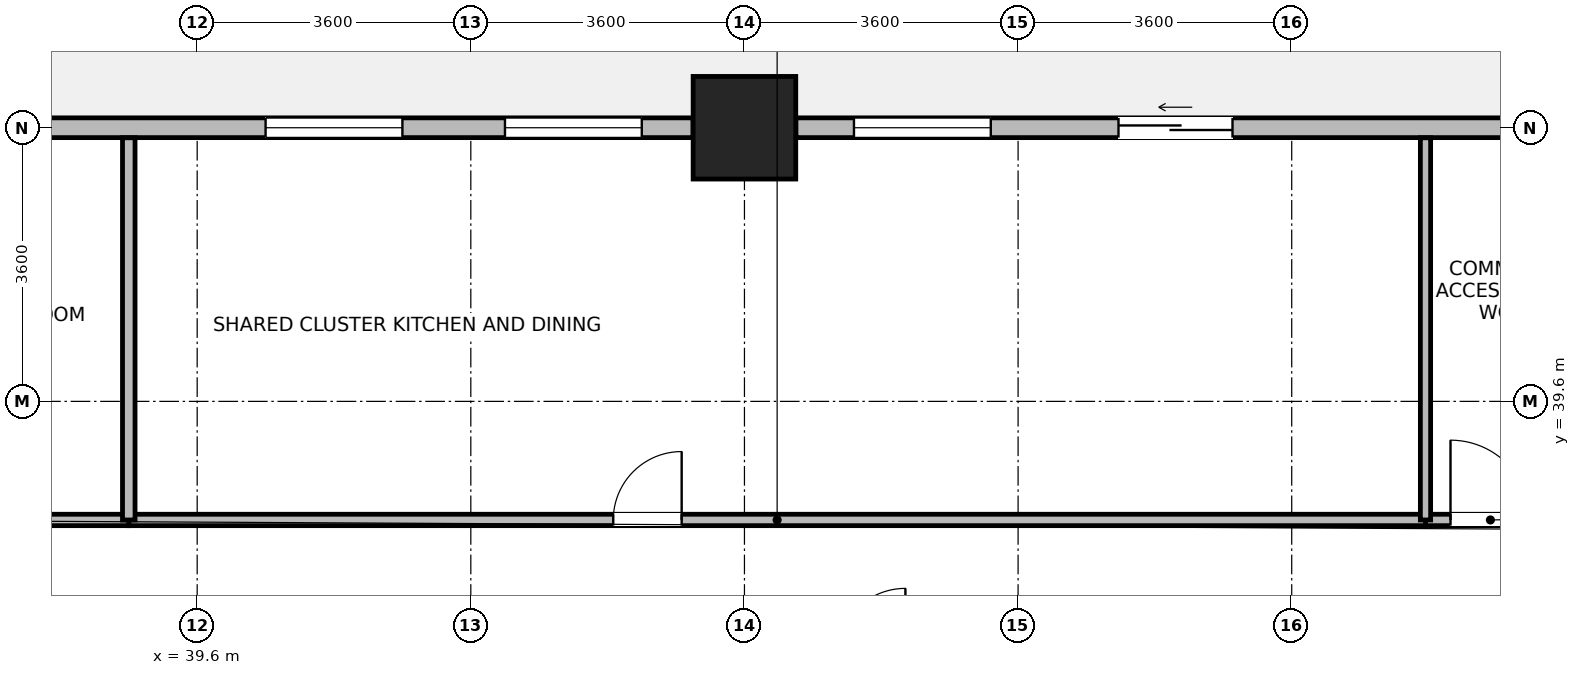
"""IFC4 building model, lengths in metres.
Left out: names, types, materials, properties, quantities, classifications, styles, units other than length and angle.
Written with IfcOpenShell. Run it as: python <this file> out.ifc"""

import sys

from ifc_helpers import new_model, si_unit, direction, frame, frame_2d, origin, origin_2d, place, context, subcontext, project, spatial, rectangle, extrude, source, transform, mapped, element, fill, save


model = new_model("IFC4")
c1 = context("Model", 3, precision=1e-05, world=origin(), true_north=direction((0.0, 1.0)))
c2 = subcontext(c1, "Body", "Model", "MODEL_VIEW")
j1 = project(units=[si_unit("LENGTHUNIT", "METRE"), si_unit("PLANEANGLEUNIT", "RADIAN")], contexts=[c1])
p1 = place(None, origin())
s1 = spatial("IfcSite", under=j1, at=p1, CompositionType="ELEMENT")
p2 = place(p1, origin())
s2 = spatial("IfcBuilding", under=s1, at=p2, CompositionType="ELEMENT")
p3 = place(p2, frame((0.0, 0.0, 36.4)))
s3 = spatial("IfcBuildingStorey", under=s2, at=p3, CompositionType="ELEMENT", Elevation=36.4)
m1 = source(origin(), c2, "Body", "SweptSolid", [
    extrude(rectangle(XDim=1.35, YDim=1.35, at=origin_2d()), origin(), (0.0, 0.0, 1.0), 3.7),
])
p4 = place(p3, frame((46.8, 43.2, 0.0), z_axis=(0.0, 0.0, 1.0), x_axis=(1.0, 0.0, 0.0)))
e1 = element("IfcColumn", 1, at=p4, inside=s3, PredefinedType="COLUMN", context=c2, shape_type="MappedRepresentation", body=[
    mapped(m1, transform((0.0, 0.0, 0.0), x_axis=(1.0, 0.0, 0.0), y_axis=(0.0, 1.0, 0.0), z_axis=(0.0, 0.0, 1.0), scale=1.0)),
])
p5 = place(p3, frame((47.476, 43.2, 0.0), z_axis=(0.0, 0.0, 1.0), x_axis=(1.0, 0.0, 0.0)))
e2 = element("IfcWall", 2, at=p5, inside=s3, PredefinedType="STANDARD", context=c2, shape_type="SweptSolid", body=[
    extrude(rectangle(XDim=9.989, YDim=0.26, at=frame_2d((4.995, 0.0))), origin(), (0.0, 0.0, 1.0), 3.43),
])
p6 = place(p5, frame((4.245, 0.0, 0.0)))
e3 = element("IfcOpeningElement", 3, at=p6, cuts=e2, PredefinedType="OPENING", context=c2, shape_type="SweptSolid", body=[
    extrude(rectangle(XDim=1.5, YDim=2.15, at=frame_2d((0.75, 1.075))), frame((0.0, 0.14, 0.0), z_axis=(0.0, -1.0, 0.0), x_axis=(1.0, 0.0, 0.0)), (0.0, 0.0, 1.0), 0.28),
])
p7 = place(p5, frame((0.765, 0.0, 0.85)))
e4 = element("IfcOpeningElement", 4, at=p7, cuts=e2, PredefinedType="OPENING", context=c2, shape_type="SweptSolid", body=[
    extrude(rectangle(XDim=1.8, YDim=1.85, at=frame_2d((0.9, 0.925))), frame((0.0, 0.14, 0.0), z_axis=(0.0, -1.0, 0.0), x_axis=(1.0, 0.0, 0.0)), (0.0, 0.0, 1.0), 0.28),
])
p8 = place(p3, frame((36.676, 43.2, 0.0), z_axis=(0.0, 0.0, 1.0), x_axis=(1.0, 0.0, 0.0)))
e5 = element("IfcWall", 5, at=p8, inside=s3, PredefinedType="STANDARD", context=c2, shape_type="SweptSolid", body=[
    extrude(rectangle(XDim=9.448, YDim=0.26, at=frame_2d((4.724, 0.0))), origin(), (0.0, 0.0, 1.0), 2.93),
])
p9 = place(p8, frame((3.824, 0.0, 0.85)))
e6 = element("IfcOpeningElement", 6, at=p9, cuts=e5, PredefinedType="OPENING", context=c2, shape_type="SweptSolid", body=[
    extrude(rectangle(XDim=1.8, YDim=1.85, at=frame_2d((0.9, 0.925))), frame((0.0, 0.14, 0.0), z_axis=(0.0, -1.0, 0.0), x_axis=(1.0, 0.0, 0.0)), (0.0, 0.0, 1.0), 0.28),
])
p10 = place(p8, frame((6.973, 0.0, 0.85)))
e7 = element("IfcOpeningElement", 7, at=p10, cuts=e5, PredefinedType="OPENING", context=c2, shape_type="SweptSolid", body=[
    extrude(rectangle(XDim=1.8, YDim=1.85, at=frame_2d((0.9, 0.925))), frame((0.0, 0.14, 0.0), z_axis=(0.0, -1.0, 0.0), x_axis=(1.0, 0.0, 0.0)), (0.0, 0.0, 1.0), 0.28),
])
p11 = place(p3, frame((38.7, 38.04, 0.0), z_axis=(0.0, 0.0, 1.0), x_axis=(1.0, 0.0, 0.0)))
e8 = element("IfcWall", 8, at=p11, inside=s3, PredefinedType="PARTITIONING", context=c2, shape_type="SweptSolid", body=[
    extrude(rectangle(XDim=17.06, YDim=0.15, at=frame_2d((8.53, 0.0))), origin(), (0.0, 0.0, 1.0), 3.43),
])
p12 = place(p11, frame((6.374, 0.0, 0.0)))
e9 = element("IfcOpeningElement", 9, at=p12, cuts=e8, PredefinedType="OPENING", context=c2, shape_type="SweptSolid", body=[
    extrude(rectangle(XDim=0.9, YDim=2.08, at=frame_2d((0.45, 1.04))), frame((0.0, 0.085, 0.0), z_axis=(0.0, -1.0, 0.0), x_axis=(1.0, 0.0, 0.0)), (0.0, 0.0, 1.0), 0.17),
])
p13 = place(p3, frame((29.72, 38.04, 0.0), z_axis=(0.0, 0.0, 1.0), x_axis=(1.0, 0.0, 0.0)))
e10 = element("IfcWall", 10, at=p13, inside=s3, PredefinedType="PARTITIONING", context=c2, shape_type="SweptSolid", body=[
    extrude(rectangle(XDim=8.98, YDim=0.15, at=frame_2d((4.49, 0.0))), origin(), (0.0, 0.0, 1.0), 3.43),
])
p14 = place(p13, frame((4.015, 0.0, 0.0)))
e11 = element("IfcOpeningElement", 11, at=p14, cuts=e10, PredefinedType="OPENING", context=c2, shape_type="SweptSolid", body=[
    extrude(rectangle(XDim=0.95, YDim=2.1, at=frame_2d((0.475, 1.05))), frame((0.0, 0.085, 0.0), z_axis=(0.0, -1.0, 0.0), x_axis=(1.0, 0.0, 0.0)), (0.0, 0.0, 1.0), 0.17),
])
p15 = place(p3, frame((55.76, 38.04, 0.0), z_axis=(0.0, 0.0, 1.0), x_axis=(1.0, 0.0, 0.0)))
e12 = element("IfcWall", 12, at=p15, inside=s3, PredefinedType="PARTITIONING", context=c2, shape_type="SweptSolid", body=[
    extrude(rectangle(XDim=1.708, YDim=0.15, at=frame_2d((0.854, 0.0))), origin(), (0.0, 0.0, 1.0), 3.43),
])
p16 = place(p15, frame((0.329, 0.0, 0.0)))
e13 = element("IfcOpeningElement", 13, at=p16, cuts=e12, PredefinedType="OPENING", context=c2, shape_type="SweptSolid", body=[
    extrude(rectangle(XDim=1.05, YDim=2.12, at=frame_2d((0.525, 1.06))), frame((0.0, 0.085, 0.0), z_axis=(0.0, -1.0, 0.0), x_axis=(1.0, 0.0, 0.0)), (0.0, 0.0, 1.0), 0.17),
])
p17 = place(p3, frame((38.7, 38.04, 0.0), z_axis=(0.0, 0.0, 1.0), x_axis=(0.0, 1.0, 0.0)))
e14 = element("IfcWall", 14, at=p17, inside=s3, PredefinedType="PARTITIONING", context=c2, shape_type="SweptSolid", body=[
    extrude(rectangle(XDim=5.028, YDim=0.165, at=frame_2d((2.514, 0.0))), origin(), (0.0, 0.0, 1.0), 3.43),
])
p18 = place(p3, frame((55.76, 38.04, 0.0), z_axis=(0.0, 0.0, 1.0), x_axis=(0.0, 1.0, 0.0)))
e15 = element("IfcWall", 15, at=p18, inside=s3, PredefinedType="PARTITIONING", context=c2, shape_type="SweptSolid", body=[
    extrude(rectangle(XDim=5.028, YDim=0.135, at=frame_2d((2.514, 0.0))), origin(), (0.0, 0.0, 1.0), 3.43),
])
p19 = place(p6, origin())
e16 = element("IfcDoor", 16, at=p19, inside=s3, OperationType="SLIDING_TO_LEFT", PredefinedType="DOOR", context=c2, shape_type="SweptSolid", body=[
    extrude(rectangle(XDim=1.5, YDim=2.15, at=frame_2d((0.75, 1.075))), frame((0.0, 0.025, 0.0), z_axis=(0.0, -1.0, 0.0), x_axis=(1.0, 0.0, 0.0)), (0.0, 0.0, 1.0), 0.05),
])
fill(e3, e16)
p20 = place(p7, origin())
e17 = element("IfcWindow", 17, at=p20, inside=s3, PartitioningType="SINGLE_PANEL", PredefinedType="WINDOW", context=c2, shape_type="SweptSolid", body=[
    extrude(rectangle(XDim=1.8, YDim=1.85, at=frame_2d((0.9, 0.925))), frame((0.0, 0.03, 0.0), z_axis=(0.0, -1.0, 0.0), x_axis=(1.0, 0.0, 0.0)), (0.0, 0.0, 1.0), 0.06),
])
fill(e4, e17)
p21 = place(p9, origin())
e18 = element("IfcWindow", 18, at=p21, inside=s3, PartitioningType="SINGLE_PANEL", PredefinedType="WINDOW", context=c2, shape_type="SweptSolid", body=[
    extrude(rectangle(XDim=1.8, YDim=1.85, at=frame_2d((0.9, 0.925))), frame((0.0, 0.03, 0.0), z_axis=(0.0, -1.0, 0.0), x_axis=(1.0, 0.0, 0.0)), (0.0, 0.0, 1.0), 0.06),
])
fill(e6, e18)
p22 = place(p10, origin())
e19 = element("IfcWindow", 19, at=p22, inside=s3, PartitioningType="SINGLE_PANEL", PredefinedType="WINDOW", context=c2, shape_type="SweptSolid", body=[
    extrude(rectangle(XDim=1.8, YDim=1.85, at=frame_2d((0.9, 0.925))), frame((0.0, 0.03, 0.0), z_axis=(0.0, -1.0, 0.0), x_axis=(1.0, 0.0, 0.0)), (0.0, 0.0, 1.0), 0.06),
])
fill(e7, e19)
p23 = place(p12, origin())
e20 = element("IfcDoor", 20, at=p23, inside=s3, OperationType="SINGLE_SWING_RIGHT", PredefinedType="DOOR", context=c2, shape_type="SweptSolid", body=[
    extrude(rectangle(XDim=0.9, YDim=2.08, at=frame_2d((0.45, 1.04))), frame((0.0, 0.025, 0.0), z_axis=(0.0, -1.0, 0.0), x_axis=(1.0, 0.0, 0.0)), (0.0, 0.0, 1.0), 0.05),
])
fill(e9, e20)
p24 = place(p16, origin())
e21 = element("IfcDoor", 21, at=p24, inside=s3, OperationType="SINGLE_SWING_LEFT", PredefinedType="DOOR", context=c2, shape_type="SweptSolid", body=[
    extrude(rectangle(XDim=1.05, YDim=2.12, at=frame_2d((0.525, 1.06))), frame((0.0, 0.025, 0.0), z_axis=(0.0, -1.0, 0.0), x_axis=(1.0, 0.0, 0.0)), (0.0, 0.0, 1.0), 0.05),
])
fill(e13, e21)
save(model, sys.argv[1])
